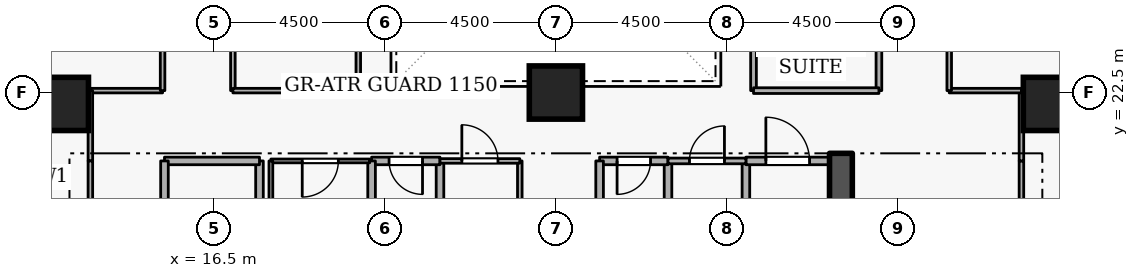
"""IFC4 building model, lengths in metres.
Left out: names, types, materials, properties, quantities, classifications, styles, units other than length and angle.
Written with IfcOpenShell. Run it as: python <this file> out.ifc"""

import sys

from ifc_helpers import new_model, si_unit, direction, frame, frame_2d, origin, origin_2d, place, context, subcontext, project, spatial, rectangle, extrude, element, fill, save


model = new_model("IFC4")
c1 = context("Model", 3, precision=1e-05, world=origin(), true_north=direction((0.0, 1.0)))
c2 = subcontext(c1, "Body", "Model", "MODEL_VIEW")
j1 = project(units=[si_unit("LENGTHUNIT", "METRE"), si_unit("PLANEANGLEUNIT", "RADIAN")], contexts=[c1])
p1 = place(None, origin())
s1 = spatial("IfcSite", under=j1, at=p1, CompositionType="ELEMENT")
p2 = place(p1, origin())
s2 = spatial("IfcBuilding", under=s1, at=p2, CompositionType="ELEMENT")
p3 = place(p2, frame((0.0, 0.0, 42.3)))
s3 = spatial("IfcBuildingStorey", under=s2, at=p3, CompositionType="ELEMENT", Elevation=42.3)
p4 = place(p3, frame((33.0, 15.2, 0.0), z_axis=(0.0, 0.0, 1.0), x_axis=(0.0, 1.0, 0.0)))
e1 = element("IfcWall", 1, at=p4, inside=s3, PredefinedType="SHEAR", context=c2, shape_type="SweptSolid", body=[
    extrude(rectangle(XDim=5.7, YDim=0.6, at=frame_2d((2.85, 0.0))), origin(), (0.0, 0.0, 1.0), 3.6),
])
for number, where, z_axis, x_axis in (
    (2, (12.5, 22.2, 0.0), (0.0, 0.0, 1.0), (1.0, 0.0, 0.0)),
    (3, (38.5, 22.2, 0.0), (0.0, 0.0, 1.0), (1.0, 0.0, 0.0)),
    (4, (25.5, 22.5, 0.0), (0.0, 0.0, 1.0), (1.0, 0.0, 0.0)),
):
    element("IfcColumn", number, at=place(p3, frame(where, z_axis=z_axis, x_axis=x_axis)), inside=s3, PredefinedType="COLUMN", context=c2, shape_type="SweptSolid", body=[
        extrude(rectangle(XDim=1.4, YDim=1.4, at=origin_2d()), origin(), (0.0, 0.0, 1.0), 3.6),
    ])
p5 = place(p3, frame((17.7, 18.4, 0.0), z_axis=(0.0, 0.0, 1.0), x_axis=(0.0, 1.0, 0.0)))
e5 = element("IfcWall", 5, at=p5, inside=s3, PredefinedType="STANDARD", context=c2, shape_type="SweptSolid", body=[
    extrude(rectangle(XDim=2.3, YDim=0.2, at=frame_2d((1.15, 0.0))), origin(), (0.0, 0.0, 1.0), 2.545),
])
p6 = place(p3, frame((17.7, 20.7, 0.0), z_axis=(0.0, 0.0, 1.0), x_axis=(-1.0, 0.0, 0.0)))
e6 = element("IfcWall", 6, at=p6, inside=s3, PredefinedType="STANDARD", context=c2, shape_type="SweptSolid", body=[
    extrude(rectangle(XDim=2.5, YDim=0.2, at=frame_2d((1.25, 0.0))), origin(), (0.0, 0.0, 1.0), 3.34),
])
p7 = place(p3, frame((15.2, 20.7, 0.0), z_axis=(0.0, 0.0, 1.0), x_axis=(0.0, -1.0, 0.0)))
e7 = element("IfcWall", 7, at=p7, inside=s3, PredefinedType="STANDARD", context=c2, shape_type="SweptSolid", body=[
    extrude(rectangle(XDim=5.7, YDim=0.2, at=frame_2d((2.85, 0.0))), origin(), (0.0, 0.0, 1.0), 3.34),
])
p8 = place(p7, frame((2.275, 0.0, 0.0)))
e8 = element("IfcOpeningElement", 8, at=p8, cuts=e7, PredefinedType="OPENING", context=c2, shape_type="SweptSolid", body=[
    extrude(rectangle(XDim=1.15, YDim=2.1, at=frame_2d((0.575, 1.05))), frame((0.0, 0.11, 0.0), z_axis=(0.0, -1.0, 0.0), x_axis=(1.0, 0.0, 0.0)), (0.0, 0.0, 1.0), 0.22),
])
p9 = place(p3, frame((28.45, 18.65, 0.0), z_axis=(0.0, 0.0, 1.0), x_axis=(0.0, 1.0, 0.0)))
e9 = element("IfcWall", 9, at=p9, inside=s3, PredefinedType="STANDARD", context=c2, shape_type="SweptSolid", body=[
    extrude(rectangle(XDim=2.05, YDim=0.2, at=frame_2d((1.025, 0.0))), origin(), (0.0, 0.0, 1.0), 3.34),
])
p10 = place(p3, frame((28.45, 20.7, 0.0), z_axis=(0.0, 0.0, 1.0), x_axis=(-1.0, 0.0, 0.0)))
e10 = element("IfcWall", 10, at=p10, inside=s3, PredefinedType="STANDARD", context=c2, shape_type="SweptSolid", body=[
    extrude(rectangle(XDim=1.8, YDim=0.2, at=frame_2d((0.9, 0.0))), origin(), (0.0, 0.0, 1.0), 3.34),
])
p11 = place(p10, frame((0.46, 0.0, 0.0)))
e11 = element("IfcOpeningElement", 11, at=p11, cuts=e10, PredefinedType="OPENING", context=c2, shape_type="SweptSolid", body=[
    extrude(rectangle(XDim=0.88, YDim=2.04, at=frame_2d((0.44, 1.02))), frame((0.0, 0.11, 0.0), z_axis=(0.0, -1.0, 0.0), x_axis=(1.0, 0.0, 0.0)), (0.0, 0.0, 1.0), 0.22),
])
for number, where, z_axis, x_axis in (
    (12, (26.65, 20.7, 0.0), (0.0, 0.0, 1.0), (0.0, -1.0, 0.0)),
    (13, (22.45, 18.65, 0.0), (0.0, 0.0, 1.0), (0.0, 1.0, 0.0)),
):
    element("IfcWall", number, at=place(p3, frame(where, z_axis=z_axis, x_axis=x_axis)), inside=s3, PredefinedType="STANDARD", context=c2, shape_type="SweptSolid", body=[
        extrude(rectangle(XDim=2.05, YDim=0.2, at=frame_2d((1.025, 0.0))), origin(), (0.0, 0.0, 1.0), 3.34),
    ])
p12 = place(p3, frame((22.45, 20.7, 0.0), z_axis=(0.0, 0.0, 1.0), x_axis=(-1.0, 0.0, 0.0)))
e14 = element("IfcWall", 14, at=p12, inside=s3, PredefinedType="STANDARD", context=c2, shape_type="SweptSolid", body=[
    extrude(rectangle(XDim=1.8, YDim=0.2, at=frame_2d((0.9, 0.0))), origin(), (0.0, 0.0, 1.0), 3.34),
])
p13 = place(p12, frame((0.46, 0.0, 0.0)))
e15 = element("IfcOpeningElement", 15, at=p13, cuts=e14, PredefinedType="OPENING", context=c2, shape_type="SweptSolid", body=[
    extrude(rectangle(XDim=0.88, YDim=2.04, at=frame_2d((0.44, 1.02))), frame((0.0, 0.11, 0.0), z_axis=(0.0, -1.0, 0.0), x_axis=(1.0, 0.0, 0.0)), (0.0, 0.0, 1.0), 0.22),
])
for number, where, z_axis, x_axis in (
    (16, (20.65, 20.7, 0.0), (0.0, 0.0, 1.0), (0.0, -1.0, 0.0)),
    (17, (30.5, 18.65, 0.0), (0.0, 0.0, 1.0), (0.0, 1.0, 0.0)),
):
    element("IfcWall", number, at=place(p3, frame(where, z_axis=z_axis, x_axis=x_axis)), inside=s3, PredefinedType="STANDARD", context=c2, shape_type="SweptSolid", body=[
        extrude(rectangle(XDim=2.05, YDim=0.2, at=frame_2d((1.025, 0.0))), origin(), (0.0, 0.0, 1.0), 3.34),
    ])
p14 = place(p3, frame((30.5, 20.7, 0.0), z_axis=(0.0, 0.0, 1.0), x_axis=(1.0, 0.0, 0.0)))
e18 = element("IfcWall", 18, at=p14, inside=s3, PredefinedType="STANDARD", context=c2, shape_type="SweptSolid", body=[
    extrude(rectangle(XDim=2.2, YDim=0.2, at=frame_2d((1.1, 0.0))), origin(), (0.0, 0.0, 1.0), 3.34),
])
p15 = place(p14, frame((0.525, 0.0, 0.0)))
e19 = element("IfcOpeningElement", 19, at=p15, cuts=e18, PredefinedType="OPENING", context=c2, shape_type="SweptSolid", body=[
    extrude(rectangle(XDim=1.15, YDim=2.1, at=frame_2d((0.575, 1.05))), frame((0.0, 0.11, 0.0), z_axis=(0.0, -1.0, 0.0), x_axis=(1.0, 0.0, 0.0)), (0.0, 0.0, 1.0), 0.22),
])
p16 = place(p3, frame((20.6, 20.7, 0.0), z_axis=(0.0, 0.0, 1.0), x_axis=(-1.0, 0.0, 0.0)))
e20 = element("IfcWall", 20, at=p16, inside=s3, PredefinedType="PARTITIONING", context=c2, shape_type="SweptSolid", body=[
    extrude(rectangle(XDim=2.6, YDim=0.1, at=frame_2d((1.3, 0.0))), origin(), (0.0, 0.0, 1.0), 3.34),
])
p17 = place(p16, frame((0.825, 0.0, 0.0)))
e21 = element("IfcOpeningElement", 21, at=p17, cuts=e20, PredefinedType="OPENING", context=c2, shape_type="SweptSolid", body=[
    extrude(rectangle(XDim=0.95, YDim=2.1, at=frame_2d((0.475, 1.05))), frame((0.0, 0.06, 0.0), z_axis=(0.0, -1.0, 0.0), x_axis=(1.0, 0.0, 0.0)), (0.0, 0.0, 1.0), 0.12),
])
p18 = place(p3, frame((18.0, 20.7, 0.0), z_axis=(0.0, 0.0, 1.0), x_axis=(0.0, -1.0, 0.0)))
e22 = element("IfcWall", 22, at=p18, inside=s3, PredefinedType="PARTITIONING", context=c2, shape_type="SweptSolid", body=[
    extrude(rectangle(XDim=2.05, YDim=0.1, at=frame_2d((1.025, 0.0))), origin(), (0.0, 0.0, 1.0), 2.545),
])
p19 = place(p3, frame((24.55, 20.7, 0.0), z_axis=(0.0, 0.0, 1.0), x_axis=(0.0, -1.0, 0.0)))
e23 = element("IfcWall", 23, at=p19, inside=s3, PredefinedType="PARTITIONING", context=c2, shape_type="SweptSolid", body=[
    extrude(rectangle(XDim=2.05, YDim=0.12, at=frame_2d((1.025, 0.0))), origin(), (0.0, 0.0, 1.0), 3.34),
])
p20 = place(p3, frame((22.45, 20.7, 0.0), z_axis=(0.0, 0.0, 1.0), x_axis=(1.0, 0.0, 0.0)))
e24 = element("IfcWall", 24, at=p20, inside=s3, PredefinedType="PARTITIONING", context=c2, shape_type="SweptSolid", body=[
    extrude(rectangle(XDim=2.1, YDim=0.12, at=frame_2d((1.05, 0.0))), origin(), (0.0, 0.0, 1.0), 3.34),
])
p21 = place(p20, frame((0.575, 0.0, 0.0)))
e25 = element("IfcOpeningElement", 25, at=p21, cuts=e24, PredefinedType="OPENING", context=c2, shape_type="SweptSolid", body=[
    extrude(rectangle(XDim=0.95, YDim=2.1, at=frame_2d((0.475, 1.05))), frame((0.0, 0.07, 0.0), z_axis=(0.0, -1.0, 0.0), x_axis=(1.0, 0.0, 0.0)), (0.0, 0.0, 1.0), 0.14),
])
p22 = place(p3, frame((28.45, 20.7, 0.0), z_axis=(0.0, 0.0, 1.0), x_axis=(1.0, 0.0, 0.0)))
e26 = element("IfcWall", 26, at=p22, inside=s3, PredefinedType="PARTITIONING", context=c2, shape_type="SweptSolid", body=[
    extrude(rectangle(XDim=2.05, YDim=0.15, at=frame_2d((1.025, 0.0))), origin(), (0.0, 0.0, 1.0), 3.34),
])
p23 = place(p22, frame((0.565, 0.0, 0.0)))
e27 = element("IfcOpeningElement", 27, at=p23, cuts=e26, PredefinedType="OPENING", context=c2, shape_type="SweptSolid", body=[
    extrude(rectangle(XDim=0.92, YDim=2.08, at=frame_2d((0.46, 1.04))), frame((0.0, 0.085, 0.0), z_axis=(0.0, -1.0, 0.0), x_axis=(1.0, 0.0, 0.0)), (0.0, 0.0, 1.0), 0.17),
])
p24 = place(p3, frame((15.15, 22.55, 0.0), z_axis=(0.0, 0.0, 1.0), x_axis=(-1.0, 0.0, 0.0)))
e28 = element("IfcWall", 28, at=p24, inside=s3, PredefinedType="PARTITIONING", context=c2, shape_type="SweptSolid", body=[
    extrude(rectangle(XDim=1.9, YDim=0.12, at=frame_2d((0.95, 0.0))), origin(), (0.0, 0.0, 1.0), 3.34),
])
p25 = place(p3, frame((13.25, 22.55, 0.0), z_axis=(0.0, 0.0, 1.0), x_axis=(0.0, -1.0, 0.0)))
e29 = element("IfcWall", 29, at=p25, inside=s3, PredefinedType="PARTITIONING", context=c2, shape_type="SweptSolid", body=[
    extrude(rectangle(XDim=1.85, YDim=0.12, at=frame_2d((0.925, 0.0))), origin(), (0.0, 0.0, 1.0), 3.34),
])
p26 = place(p3, frame((13.25, 20.7, 0.0), z_axis=(0.0, 0.0, 1.0), x_axis=(0.0, -1.0, 0.0)))
e30 = element("IfcWall", 30, at=p26, inside=s3, PredefinedType="PARTITIONING", context=c2, shape_type="SweptSolid", body=[
    extrude(rectangle(XDim=9.35, YDim=0.12, at=frame_2d((4.675, 0.0))), origin(), (0.0, 0.0, 1.0), 3.34),
])
p27 = place(p26, frame((4.15, 0.0, 0.0)))
e31 = element("IfcOpeningElement", 31, at=p27, cuts=e30, PredefinedType="OPENING", context=c2, shape_type="SweptSolid", body=[
    extrude(rectangle(XDim=1.05, YDim=2.1, at=frame_2d((0.525, 1.05))), frame((0.0, 0.07, 0.0), z_axis=(0.0, -1.0, 0.0), x_axis=(1.0, 0.0, 0.0)), (0.0, 0.0, 1.0), 0.14),
])
p28 = place(p3, frame((15.15, 27.0, 0.0), z_axis=(0.0, 0.0, 1.0), x_axis=(0.0, -1.0, 0.0)))
e32 = element("IfcWall", 32, at=p28, inside=s3, PredefinedType="PARTITIONING", context=c2, shape_type="SweptSolid", body=[
    extrude(rectangle(XDim=4.45, YDim=0.12, at=frame_2d((2.225, 0.0))), origin(), (0.0, 0.0, 1.0), 3.34),
])
p29 = place(p3, frame((37.75, 17.55, 0.0), z_axis=(0.0, 0.0, 1.0), x_axis=(0.0, 1.0, 0.0)))
e33 = element("IfcWall", 33, at=p29, inside=s3, PredefinedType="PARTITIONING", context=c2, shape_type="SweptSolid", body=[
    extrude(rectangle(XDim=3.15, YDim=0.12, at=frame_2d((1.575, 0.0))), origin(), (0.0, 0.0, 1.0), 3.34),
])
p30 = place(p3, frame((37.75, 20.7, 0.0), z_axis=(0.0, 0.0, 1.0), x_axis=(0.0, 1.0, 0.0)))
e34 = element("IfcWall", 34, at=p30, inside=s3, PredefinedType="PARTITIONING", context=c2, shape_type="SweptSolid", body=[
    extrude(rectangle(XDim=1.85, YDim=0.12, at=frame_2d((0.925, 0.0))), origin(), (0.0, 0.0, 1.0), 3.34),
])
p31 = place(p3, frame((37.75, 22.55, 0.0), z_axis=(0.0, 0.0, 1.0), x_axis=(-1.0, 0.0, 0.0)))
e35 = element("IfcWall", 35, at=p31, inside=s3, PredefinedType="PARTITIONING", context=c2, shape_type="SweptSolid", body=[
    extrude(rectangle(XDim=1.9, YDim=0.12, at=frame_2d((0.95, 0.0))), origin(), (0.0, 0.0, 1.0), 3.34),
])
p32 = place(p3, frame((35.85, 22.55, 0.0), z_axis=(0.0, 0.0, 1.0), x_axis=(0.0, 1.0, 0.0)))
e36 = element("IfcWall", 36, at=p32, inside=s3, PredefinedType="PARTITIONING", context=c2, shape_type="SweptSolid", body=[
    extrude(rectangle(XDim=4.45, YDim=0.12, at=frame_2d((2.225, 0.0))), origin(), (0.0, 0.0, 1.0), 3.34),
])
p33 = place(p32, frame((1.7, 0.0, 0.0)))
e37 = element("IfcOpeningElement", 37, at=p33, cuts=e36, PredefinedType="OPENING", context=c2, shape_type="SweptSolid", body=[
    extrude(rectangle(XDim=1.05, YDim=2.1, at=frame_2d((0.525, 1.05))), frame((0.0, 0.07, 0.0), z_axis=(0.0, -1.0, 0.0), x_axis=(1.0, 0.0, 0.0)), (0.0, 0.0, 1.0), 0.14),
])
p34 = place(p3, frame((30.7, 22.55, 0.0), z_axis=(0.0, 0.0, 1.0), x_axis=(0.0, 1.0, 0.0)))
e38 = element("IfcWall", 38, at=p34, inside=s3, PredefinedType="PARTITIONING", context=c2, shape_type="SweptSolid", body=[
    extrude(rectangle(XDim=8.9, YDim=0.15, at=frame_2d((4.45, 0.0))), origin(), (0.0, 0.0, 1.0), 3.34),
])
p35 = place(p3, frame((34.0, 31.45, 0.0), z_axis=(0.0, 0.0, 1.0), x_axis=(0.0, -1.0, 0.0)))
e39 = element("IfcWall", 39, at=p35, inside=s3, PredefinedType="PARTITIONING", context=c2, shape_type="SweptSolid", body=[
    extrude(rectangle(XDim=8.9, YDim=0.15, at=frame_2d((4.45, 0.0))), origin(), (0.0, 0.0, 1.0), 3.34),
])
p36 = place(p35, frame((3.8, 0.0, 0.0)))
e40 = element("IfcOpeningElement", 40, at=p36, cuts=e39, PredefinedType="OPENING", context=c2, shape_type="SweptSolid", body=[
    extrude(rectangle(XDim=1.3, YDim=2.12, at=frame_2d((0.65, 1.06))), frame((0.0, 0.085, 0.0), z_axis=(0.0, -1.0, 0.0), x_axis=(1.0, 0.0, 0.0)), (0.0, 0.0, 1.0), 0.17),
])
p37 = place(p3, frame((34.0, 22.55, 0.0), z_axis=(0.0, 0.0, 1.0), x_axis=(-1.0, 0.0, 0.0)))
e41 = element("IfcWall", 41, at=p37, inside=s3, PredefinedType="PARTITIONING", context=c2, shape_type="SweptSolid", body=[
    extrude(rectangle(XDim=3.3, YDim=0.15, at=frame_2d((1.65, 0.0))), origin(), (0.0, 0.0, 1.0), 3.34),
])
p38 = place(p3, frame((17.0, 22.55, 0.0), z_axis=(0.0, 0.0, 1.0), x_axis=(0.0, 1.0, 0.0)))
e42 = element("IfcWall", 42, at=p38, inside=s3, PredefinedType="PARTITIONING", context=c2, shape_type="SweptSolid", body=[
    extrude(rectangle(XDim=8.9, YDim=0.12, at=frame_2d((4.45, 0.0))), origin(), (0.0, 0.0, 1.0), 3.34),
])
p39 = place(p38, frame((3.975, 0.0, 0.0)))
e43 = element("IfcOpeningElement", 43, at=p39, cuts=e42, PredefinedType="OPENING", context=c2, shape_type="SweptSolid", body=[
    extrude(rectangle(XDim=0.95, YDim=2.1, at=frame_2d((0.475, 1.05))), frame((0.0, 0.07, 0.0), z_axis=(0.0, -1.0, 0.0), x_axis=(1.0, 0.0, 0.0)), (0.0, 0.0, 1.0), 0.14),
])
p40 = place(p3, frame((20.3, 31.45, 0.0), z_axis=(0.0, 0.0, 1.0), x_axis=(0.0, -1.0, 0.0)))
e44 = element("IfcWall", 44, at=p40, inside=s3, PredefinedType="PARTITIONING", context=c2, shape_type="SweptSolid", body=[
    extrude(rectangle(XDim=8.9, YDim=0.12, at=frame_2d((4.45, 0.0))), origin(), (0.0, 0.0, 1.0), 3.34),
])
p41 = place(p3, frame((20.3, 22.55, 0.0), z_axis=(0.0, 0.0, 1.0), x_axis=(-1.0, 0.0, 0.0)))
e45 = element("IfcWall", 45, at=p41, inside=s3, PredefinedType="PARTITIONING", context=c2, shape_type="SweptSolid", body=[
    extrude(rectangle(XDim=3.3, YDim=0.12, at=frame_2d((1.65, 0.0))), origin(), (0.0, 0.0, 1.0), 3.34),
])
p42 = place(p11, origin())
e46 = element("IfcDoor", 46, at=p42, inside=s3, OperationType="SINGLE_SWING_RIGHT", PredefinedType="DOOR", context=c2, shape_type="SweptSolid", body=[
    extrude(rectangle(XDim=0.88, YDim=2.04, at=frame_2d((0.44, 1.02))), frame((0.0, 0.025, 0.0), z_axis=(0.0, -1.0, 0.0), x_axis=(1.0, 0.0, 0.0)), (0.0, 0.0, 1.0), 0.05),
])
fill(e11, e46)
p43 = place(p13, origin())
e47 = element("IfcDoor", 47, at=p43, inside=s3, OperationType="SINGLE_SWING_LEFT", PredefinedType="DOOR", context=c2, shape_type="SweptSolid", body=[
    extrude(rectangle(XDim=0.88, YDim=2.04, at=frame_2d((0.44, 1.02))), frame((0.0, 0.025, 0.0), z_axis=(0.0, -1.0, 0.0), x_axis=(1.0, 0.0, 0.0)), (0.0, 0.0, 1.0), 0.05),
])
fill(e15, e47)
p44 = place(p17, origin())
e48 = element("IfcDoor", 48, at=p44, inside=s3, OperationType="SINGLE_SWING_RIGHT", PredefinedType="DOOR", context=c2, shape_type="SweptSolid", body=[
    extrude(rectangle(XDim=0.95, YDim=2.1, at=frame_2d((0.475, 1.05))), frame((0.0, 0.025, 0.0), z_axis=(0.0, -1.0, 0.0), x_axis=(1.0, 0.0, 0.0)), (0.0, 0.0, 1.0), 0.05),
])
fill(e21, e48)
p45 = place(p21, origin())
e49 = element("IfcDoor", 49, at=p45, inside=s3, OperationType="SINGLE_SWING_LEFT", PredefinedType="DOOR", context=c2, shape_type="SweptSolid", body=[
    extrude(rectangle(XDim=0.95, YDim=2.1, at=frame_2d((0.475, 1.05))), frame((0.0, 0.025, 0.0), z_axis=(0.0, -1.0, 0.0), x_axis=(1.0, 0.0, 0.0)), (0.0, 0.0, 1.0), 0.05),
])
fill(e25, e49)
p46 = place(p23, origin())
e50 = element("IfcDoor", 50, at=p46, inside=s3, OperationType="SINGLE_SWING_RIGHT", PredefinedType="DOOR", context=c2, shape_type="SweptSolid", body=[
    extrude(rectangle(XDim=0.92, YDim=2.08, at=frame_2d((0.46, 1.04))), frame((0.0, 0.025, 0.0), z_axis=(0.0, -1.0, 0.0), x_axis=(1.0, 0.0, 0.0)), (0.0, 0.0, 1.0), 0.05),
])
fill(e27, e50)
p47 = place(p15, origin())
e51 = element("IfcDoor", 51, at=p47, inside=s3, OperationType="SINGLE_SWING_LEFT", PredefinedType="DOOR", context=c2, shape_type="SweptSolid", body=[
    extrude(rectangle(XDim=1.15, YDim=2.1, at=frame_2d((0.575, 1.05))), frame((0.0, 0.025, 0.0), z_axis=(0.0, -1.0, 0.0), x_axis=(1.0, 0.0, 0.0)), (0.0, 0.0, 1.0), 0.05),
])
fill(e19, e51)
save(model, sys.argv[1])
